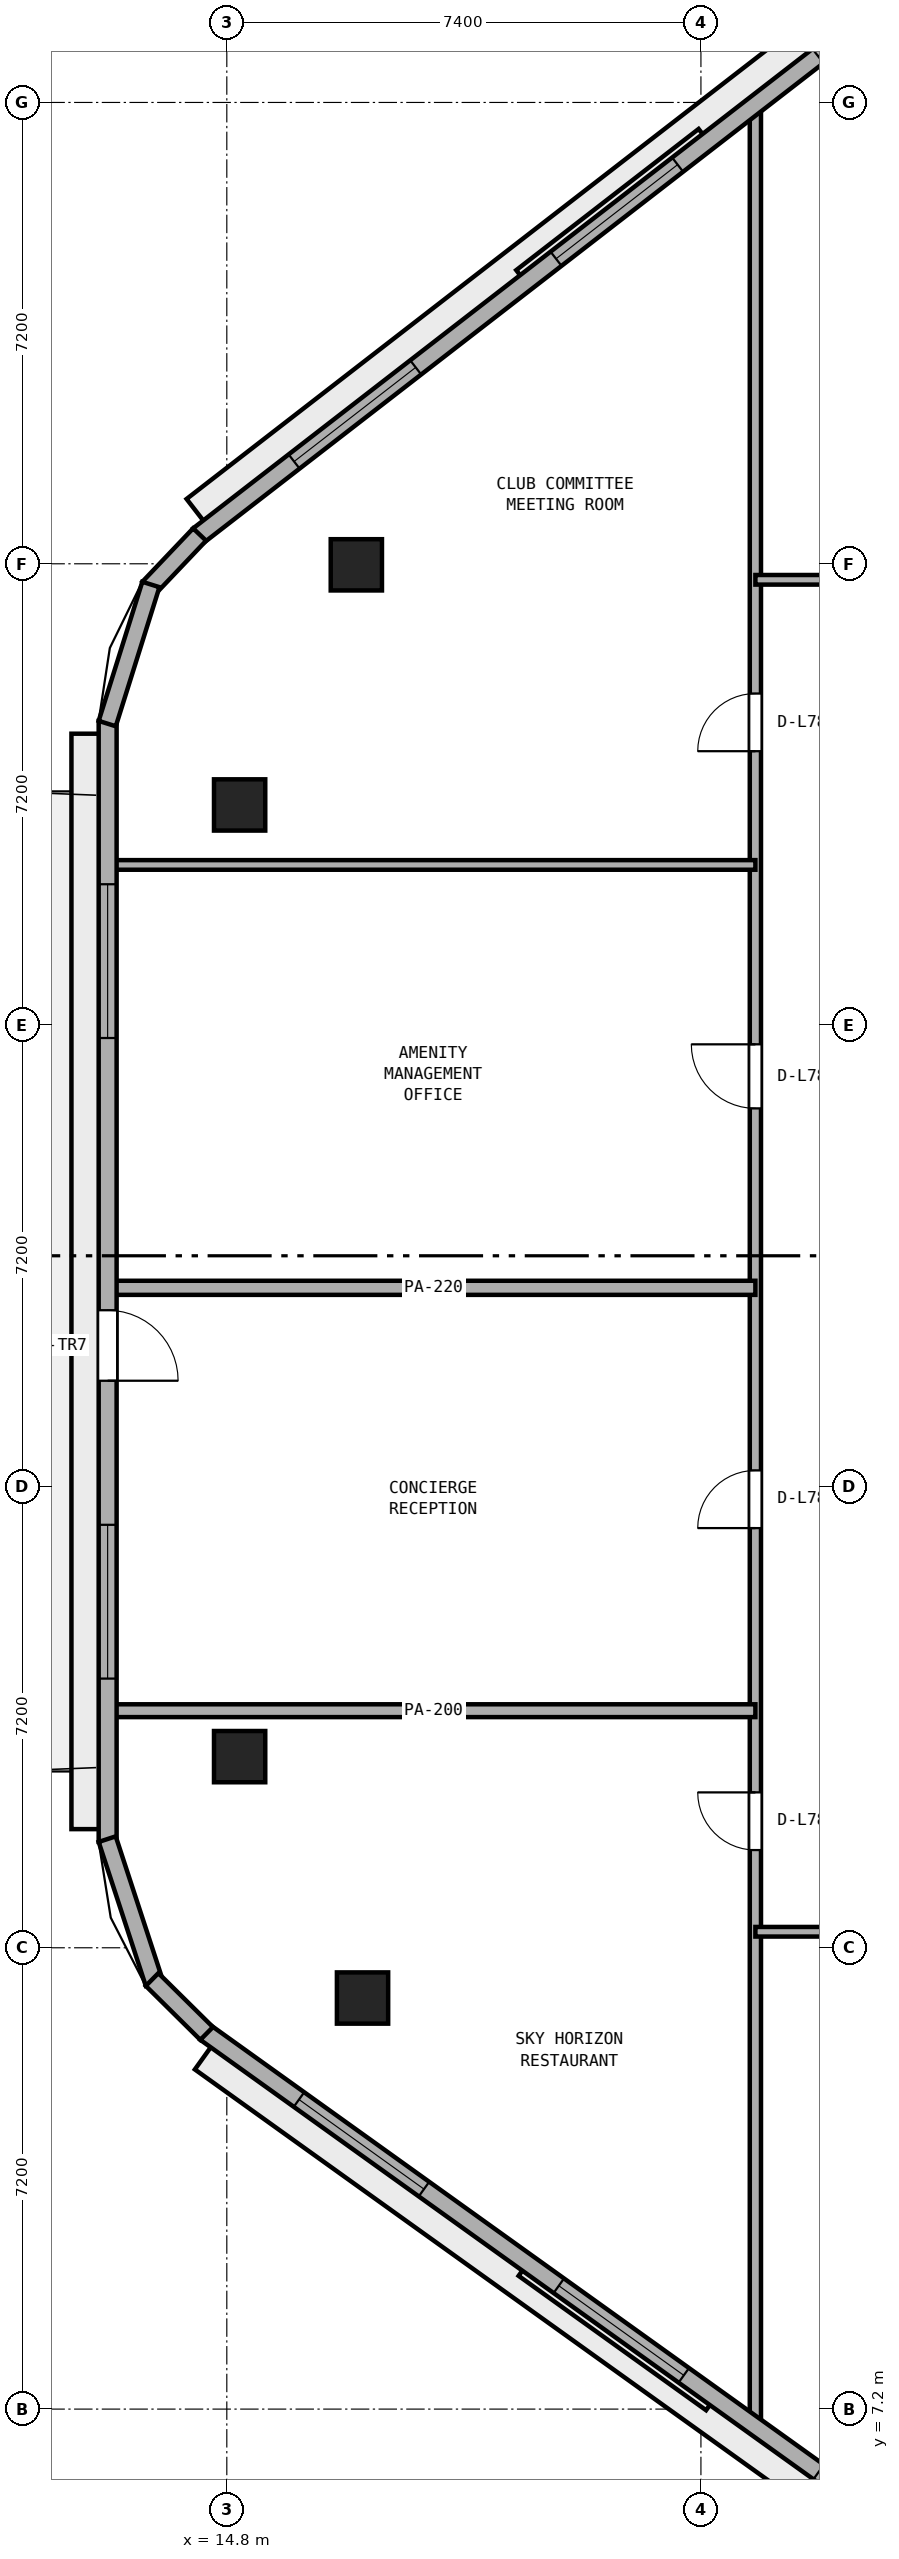
"""IFC4 building model, lengths in metres.
Left out: names, types, materials, properties, quantities, classifications, styles, units other than length and angle.
Written with IfcOpenShell. Run it as: python <this file> out.ifc"""

import sys

from ifc_helpers import new_model, si_unit, direction, frame, frame_2d, origin, origin_2d, place, context, subcontext, project, spatial, rectangle, extrude, element, fill, save


model = new_model("IFC4")
c1 = context("Model", 3, precision=1e-05, world=origin(), true_north=direction((0.0, 1.0)))
c2 = subcontext(c1, "Body", "Model", "MODEL_VIEW")
j1 = project(units=[si_unit("LENGTHUNIT", "METRE"), si_unit("PLANEANGLEUNIT", "RADIAN")], contexts=[c1])
p1 = place(None, origin())
s1 = spatial("IfcSite", under=j1, at=p1, CompositionType="ELEMENT")
p2 = place(p1, origin())
s2 = spatial("IfcBuilding", under=s1, at=p2, CompositionType="ELEMENT")
p3 = place(p2, frame((0.0, 0.0, 304.8)))
s3 = spatial("IfcBuildingStorey", under=s2, at=p3, CompositionType="ELEMENT", Elevation=304.8)
for number, where, z_axis, x_axis in (
    (1, (16.822, 35.984, 0.0), (0.0, 0.0, 1.0), (1.0, 0.0, 0.0)),
    (2, (15.0, 32.236, 0.0), (0.0, 0.0, 1.0), (1.0, 0.0, 0.0)),
    (3, (15.0, 17.383, 0.0), (0.0, 0.0, 1.0), (1.0, 0.0, 0.0)),
    (4, (16.918, 13.616, 0.0), (0.0, 0.0, 1.0), (1.0, 0.0, 0.0)),
):
    element("IfcColumn", number, at=place(p3, frame(where, z_axis=z_axis, x_axis=x_axis)), inside=s3, PredefinedType="COLUMN", context=c2, shape_type="SweptSolid", body=[
        extrude(rectangle(XDim=0.8, YDim=0.8, at=origin_2d()), origin(), (0.0, 0.0, 1.0), 3.8),
    ])
p4 = place(p3, frame((23.05, 6.894, 0.0), z_axis=(0.0, 0.0, 1.0), x_axis=(0.0, 1.0, 0.0)))
e5 = element("IfcWall", 5, at=p4, inside=s3, PredefinedType="PARTITIONING", context=c2, shape_type="SweptSolid", body=[
    extrude(rectangle(XDim=36.312, YDim=0.175, at=frame_2d((18.156, 0.0))), origin(), (0.0, 0.0, 1.0), 3.4),
])
p5 = place(p4, frame((9.031, 0.0, 0.0)))
e6 = element("IfcOpeningElement", 6, at=p5, cuts=e5, PredefinedType="OPENING", context=c2, shape_type="SweptSolid", body=[
    extrude(rectangle(XDim=0.9, YDim=2.1, at=frame_2d((0.45, 1.05))), frame((0.0, 0.097, 0.0), z_axis=(0.0, -1.0, 0.0), x_axis=(1.0, 0.0, 0.0)), (0.0, 0.0, 1.0), 0.195),
])
p6 = place(p4, frame((14.056, 0.0, 0.0)))
e7 = element("IfcOpeningElement", 7, at=p6, cuts=e5, PredefinedType="OPENING", context=c2, shape_type="SweptSolid", body=[
    extrude(rectangle(XDim=0.9, YDim=2.1, at=frame_2d((0.45, 1.05))), frame((0.0, 0.097, 0.0), z_axis=(0.0, -1.0, 0.0), x_axis=(1.0, 0.0, 0.0)), (0.0, 0.0, 1.0), 0.195),
])
p7 = place(p4, frame((20.606, 0.0, 0.0)))
e8 = element("IfcOpeningElement", 8, at=p7, cuts=e5, PredefinedType="OPENING", context=c2, shape_type="SweptSolid", body=[
    extrude(rectangle(XDim=1.0, YDim=2.12, at=frame_2d((0.5, 1.06))), frame((0.0, 0.097, 0.0), z_axis=(0.0, -1.0, 0.0), x_axis=(1.0, 0.0, 0.0)), (0.0, 0.0, 1.0), 0.195),
])
p8 = place(p4, frame((26.181, 0.0, 0.0)))
e9 = element("IfcOpeningElement", 9, at=p8, cuts=e5, PredefinedType="OPENING", context=c2, shape_type="SweptSolid", body=[
    extrude(rectangle(XDim=0.9, YDim=2.1, at=frame_2d((0.45, 1.05))), frame((0.0, 0.097, 0.0), z_axis=(0.0, -1.0, 0.0), x_axis=(1.0, 0.0, 0.0)), (0.0, 0.0, 1.0), 0.195),
])
p9 = place(p3, frame((23.05, 14.65, 0.0), z_axis=(0.0, 0.0, 1.0), x_axis=(1.0, 0.0, 0.0)))
e10 = element("IfcWall", 10, at=p9, inside=s3, PredefinedType="PARTITIONING", context=c2, shape_type="SweptSolid", body=[
    extrude(rectangle(XDim=12.6, YDim=0.15, at=frame_2d((6.3, 0.0))), origin(), (0.0, 0.0, 1.0), 3.4),
])
p10 = place(p9, frame((2.645, 0.0, 0.0)))
e11 = element("IfcOpeningElement", 11, at=p10, cuts=e10, PredefinedType="OPENING", context=c2, shape_type="SweptSolid", body=[
    extrude(rectangle(XDim=0.9, YDim=2.1, at=frame_2d((0.45, 1.05))), frame((0.0, 0.085, 0.0), z_axis=(0.0, -1.0, 0.0), x_axis=(1.0, 0.0, 0.0)), (0.0, 0.0, 1.0), 0.17),
])
p11 = place(p3, frame((13.005, 18.1, 0.0), z_axis=(0.0, 0.0, 1.0), x_axis=(1.0, 0.0, 0.0)))
e12 = element("IfcWall", 12, at=p11, inside=s3, PredefinedType="PARTITIONING", context=c2, shape_type="SweptSolid", body=[
    extrude(rectangle(XDim=10.045, YDim=0.2, at=frame_2d((5.022, 0.0))), origin(), (0.0, 0.0, 1.0), 3.4),
])
p12 = place(p3, frame((13.005, 24.7, 0.0), z_axis=(0.0, 0.0, 1.0), x_axis=(1.0, 0.0, 0.0)))
e13 = element("IfcWall", 13, at=p12, inside=s3, PredefinedType="PARTITIONING", context=c2, shape_type="SweptSolid", body=[
    extrude(rectangle(XDim=10.045, YDim=0.22, at=frame_2d((5.022, 0.0))), origin(), (0.0, 0.0, 1.0), 3.4),
])
p13 = place(p3, frame((13.005, 31.3, 0.0), z_axis=(0.0, 0.0, 1.0), x_axis=(1.0, 0.0, 0.0)))
e14 = element("IfcWall", 14, at=p13, inside=s3, PredefinedType="PARTITIONING", context=c2, shape_type="SweptSolid", body=[
    extrude(rectangle(XDim=10.045, YDim=0.15, at=frame_2d((5.022, 0.0))), origin(), (0.0, 0.0, 1.0), 3.4),
])
p14 = place(p3, frame((23.05, 35.75, 0.0), z_axis=(0.0, 0.0, 1.0), x_axis=(1.0, 0.0, 0.0)))
e15 = element("IfcWall", 15, at=p14, inside=s3, PredefinedType="PARTITIONING", context=c2, shape_type="SweptSolid", body=[
    extrude(rectangle(XDim=25.55, YDim=0.15, at=frame_2d((12.775, 0.0))), origin(), (0.0, 0.0, 1.0), 3.4),
])
p15 = place(p14, frame((6.345, 0.0, 0.0)))
e16 = element("IfcOpeningElement", 16, at=p15, cuts=e15, PredefinedType="OPENING", context=c2, shape_type="SweptSolid", body=[
    extrude(rectangle(XDim=1.0, YDim=2.12, at=frame_2d((0.5, 1.06))), frame((0.0, 0.085, 0.0), z_axis=(0.0, -1.0, 0.0), x_axis=(1.0, 0.0, 0.0)), (0.0, 0.0, 1.0), 0.17),
])
p16 = place(p14, frame((18.93, 0.0, 0.0)))
e17 = element("IfcOpeningElement", 17, at=p16, cuts=e15, PredefinedType="OPENING", context=c2, shape_type="SweptSolid", body=[
    extrude(rectangle(XDim=0.9, YDim=2.1, at=frame_2d((0.45, 1.05))), frame((0.0, 0.085, 0.0), z_axis=(0.0, -1.0, 0.0), x_axis=(1.0, 0.0, 0.0)), (0.0, 0.0, 1.0), 0.17),
])
p17 = place(p3, frame((27.415, 46.547, 0.0), z_axis=(0.0, 0.0, 1.0), x_axis=(-0.790789745248, -0.612087884875, 0.0)))
e18 = element("IfcWall", 18, at=p17, inside=s3, PredefinedType="STANDARD", context=c2, shape_type="SweptSolid", body=[
    extrude(rectangle(XDim=16.509, YDim=0.28, at=frame_2d((8.254, 0.0))), origin(), (0.0, 0.0, 1.0), 3.4),
])
p18 = place(p17, frame((1.885, 0.0, 0.9)))
e19 = element("IfcOpeningElement", 19, at=p18, cuts=e18, PredefinedType="OPENING", context=c2, shape_type="SweptSolid", body=[
    extrude(rectangle(XDim=2.4, YDim=1.75, at=frame_2d((1.2, 0.875))), frame((0.0, 0.15, 0.0), z_axis=(0.0, -1.0, 0.0), x_axis=(1.0, 0.0, 0.0)), (0.0, 0.0, 1.0), 0.3),
])
p19 = place(p17, frame((7.055, 0.0, 0.9)))
e20 = element("IfcOpeningElement", 20, at=p19, cuts=e18, PredefinedType="OPENING", context=c2, shape_type="SweptSolid", body=[
    extrude(rectangle(XDim=2.4, YDim=1.75, at=frame_2d((1.2, 0.875))), frame((0.0, 0.15, 0.0), z_axis=(0.0, -1.0, 0.0), x_axis=(1.0, 0.0, 0.0)), (0.0, 0.0, 1.0), 0.3),
])
p20 = place(p17, frame((12.224, 0.0, 0.9)))
e21 = element("IfcOpeningElement", 21, at=p20, cuts=e18, PredefinedType="OPENING", context=c2, shape_type="SweptSolid", body=[
    extrude(rectangle(XDim=2.4, YDim=1.75, at=frame_2d((1.2, 0.875))), frame((0.0, 0.15, 0.0), z_axis=(0.0, -1.0, 0.0), x_axis=(1.0, 0.0, 0.0)), (0.0, 0.0, 1.0), 0.3),
])
p21 = place(p3, frame((12.94, 33.548, 0.0), z_axis=(0.0, 0.0, 1.0), x_axis=(0.0, -1.0, 0.0)))
e22 = element("IfcWall", 22, at=p21, inside=s3, PredefinedType="STANDARD", context=c2, shape_type="SweptSolid", body=[
    extrude(rectangle(XDim=17.496, YDim=0.28, at=frame_2d((8.748, 0.0))), origin(), (0.0, 0.0, 1.0), 3.4),
])
p22 = place(p21, frame((9.198, 0.0, 0.0)))
e23 = element("IfcOpeningElement", 23, at=p22, cuts=e22, PredefinedType="OPENING", context=c2, shape_type="SweptSolid", body=[
    extrude(rectangle(XDim=1.1, YDim=2.2, at=frame_2d((0.55, 1.1))), frame((0.0, 0.15, 0.0), z_axis=(0.0, -1.0, 0.0), x_axis=(1.0, 0.0, 0.0)), (0.0, 0.0, 1.0), 0.3),
])
p23 = place(p21, frame((2.549, 0.0, 0.9)))
e24 = element("IfcOpeningElement", 24, at=p23, cuts=e22, PredefinedType="OPENING", context=c2, shape_type="SweptSolid", body=[
    extrude(rectangle(XDim=2.4, YDim=1.75, at=frame_2d((1.2, 0.875))), frame((0.0, 0.15, 0.0), z_axis=(0.0, -1.0, 0.0), x_axis=(1.0, 0.0, 0.0)), (0.0, 0.0, 1.0), 0.3),
])
p24 = place(p21, frame((12.547, 0.0, 0.9)))
e25 = element("IfcOpeningElement", 25, at=p24, cuts=e22, PredefinedType="OPENING", context=c2, shape_type="SweptSolid", body=[
    extrude(rectangle(XDim=2.4, YDim=1.75, at=frame_2d((1.2, 0.875))), frame((0.0, 0.15, 0.0), z_axis=(0.0, -1.0, 0.0), x_axis=(1.0, 0.0, 0.0)), (0.0, 0.0, 1.0), 0.3),
])
p25 = place(p3, frame((14.468, 13.077, 0.0), z_axis=(0.0, 0.0, 1.0), x_axis=(0.812809888039, -0.582529042972, 0.0)))
e26 = element("IfcWall", 26, at=p25, inside=s3, PredefinedType="STANDARD", context=c2, shape_type="SweptSolid", body=[
    extrude(rectangle(XDim=15.968, YDim=0.28, at=frame_2d((7.984, 0.0))), origin(), (0.0, 0.0, 1.0), 3.4),
])
p26 = place(p25, frame((1.795, 0.0, 0.9)))
e27 = element("IfcOpeningElement", 27, at=p26, cuts=e26, PredefinedType="OPENING", context=c2, shape_type="SweptSolid", body=[
    extrude(rectangle(XDim=2.4, YDim=1.75, at=frame_2d((1.2, 0.875))), frame((0.0, 0.15, 0.0), z_axis=(0.0, -1.0, 0.0), x_axis=(1.0, 0.0, 0.0)), (0.0, 0.0, 1.0), 0.3),
])
p27 = place(p25, frame((6.784, 0.0, 0.9)))
e28 = element("IfcOpeningElement", 28, at=p27, cuts=e26, PredefinedType="OPENING", context=c2, shape_type="SweptSolid", body=[
    extrude(rectangle(XDim=2.4, YDim=1.75, at=frame_2d((1.2, 0.875))), frame((0.0, 0.15, 0.0), z_axis=(0.0, -1.0, 0.0), x_axis=(1.0, 0.0, 0.0)), (0.0, 0.0, 1.0), 0.3),
])
p28 = place(p25, frame((11.773, 0.0, 0.9)))
e29 = element("IfcOpeningElement", 29, at=p28, cuts=e26, PredefinedType="OPENING", context=c2, shape_type="SweptSolid", body=[
    extrude(rectangle(XDim=2.4, YDim=1.75, at=frame_2d((1.2, 0.875))), frame((0.0, 0.15, 0.0), z_axis=(0.0, -1.0, 0.0), x_axis=(1.0, 0.0, 0.0)), (0.0, 0.0, 1.0), 0.3),
])
p29 = place(p3, frame((14.375, 36.457, 0.0), z_axis=(0.0, 0.0, 1.0), x_axis=(-0.68895569752, -0.724803453948, 0.0)))
e30 = element("IfcWall", 30, at=p29, inside=s3, PredefinedType="STANDARD", context=c2, shape_type="SweptSolid", body=[
    extrude(rectangle(XDim=1.151, YDim=0.28, at=frame_2d((0.575, 0.0))), origin(), (0.0, 0.0, 1.0), 3.4),
])
p30 = place(p3, frame((13.615, 35.677, 0.0), z_axis=(0.0, 0.0, 1.0), x_axis=(-0.299374552426, -0.954135670311, 0.0)))
e31 = element("IfcWall", 31, at=p30, inside=s3, PredefinedType="STANDARD", context=c2, shape_type="SweptSolid", body=[
    extrude(rectangle(XDim=2.275, YDim=0.28, at=frame_2d((1.138, 0.0))), origin(), (0.0, 0.0, 1.0), 3.4),
])
p31 = place(p3, frame((12.933, 16.095, 0.0), z_axis=(0.0, 0.0, 1.0), x_axis=(0.3110492363, -0.950393798695, 0.0)))
e32 = element("IfcWall", 32, at=p31, inside=s3, PredefinedType="STANDARD", context=c2, shape_type="SweptSolid", body=[
    extrude(rectangle(XDim=2.364, YDim=0.28, at=frame_2d((1.182, 0.0))), origin(), (0.0, 0.0, 1.0), 3.4),
])
p32 = place(p3, frame((13.634, 13.904, 0.0), z_axis=(0.0, 0.0, 1.0), x_axis=(0.710971221429, -0.703221104845, 0.0)))
e33 = element("IfcWall", 33, at=p32, inside=s3, PredefinedType="STANDARD", context=c2, shape_type="SweptSolid", body=[
    extrude(rectangle(XDim=1.197, YDim=0.28, at=frame_2d((0.599, 0.0))), origin(), (0.0, 0.0, 1.0), 3.4),
])
p33 = place(p5, origin())
e34 = element("IfcDoor", 34, at=p33, inside=s3, OperationType="SINGLE_SWING_RIGHT", PredefinedType="DOOR", context=c2, shape_type="SweptSolid", body=[
    extrude(rectangle(XDim=0.9, YDim=2.1, at=frame_2d((0.45, 1.05))), frame((0.0, 0.025, 0.0), z_axis=(0.0, -1.0, 0.0), x_axis=(1.0, 0.0, 0.0)), (0.0, 0.0, 1.0), 0.05),
])
fill(e6, e34)
p34 = place(p6, origin())
e35 = element("IfcDoor", 35, at=p34, inside=s3, OperationType="SINGLE_SWING_LEFT", PredefinedType="DOOR", context=c2, shape_type="SweptSolid", body=[
    extrude(rectangle(XDim=0.9, YDim=2.1, at=frame_2d((0.45, 1.05))), frame((0.0, 0.025, 0.0), z_axis=(0.0, -1.0, 0.0), x_axis=(1.0, 0.0, 0.0)), (0.0, 0.0, 1.0), 0.05),
])
fill(e7, e35)
p35 = place(p7, origin())
e36 = element("IfcDoor", 36, at=p35, inside=s3, OperationType="SINGLE_SWING_RIGHT", PredefinedType="DOOR", context=c2, shape_type="SweptSolid", body=[
    extrude(rectangle(XDim=1.0, YDim=2.12, at=frame_2d((0.5, 1.06))), frame((0.0, 0.025, 0.0), z_axis=(0.0, -1.0, 0.0), x_axis=(1.0, 0.0, 0.0)), (0.0, 0.0, 1.0), 0.05),
])
fill(e8, e36)
p36 = place(p8, origin())
e37 = element("IfcDoor", 37, at=p36, inside=s3, OperationType="SINGLE_SWING_LEFT", PredefinedType="DOOR", context=c2, shape_type="SweptSolid", body=[
    extrude(rectangle(XDim=0.9, YDim=2.1, at=frame_2d((0.45, 1.05))), frame((0.0, 0.025, 0.0), z_axis=(0.0, -1.0, 0.0), x_axis=(1.0, 0.0, 0.0)), (0.0, 0.0, 1.0), 0.05),
])
fill(e9, e37)
p37 = place(p18, origin())
e38 = element("IfcWindow", 38, at=p37, inside=s3, PartitioningType="SINGLE_PANEL", PredefinedType="WINDOW", context=c2, shape_type="SweptSolid", body=[
    extrude(rectangle(XDim=2.4, YDim=1.75, at=frame_2d((1.2, 0.875))), frame((0.0, 0.03, 0.0), z_axis=(0.0, -1.0, 0.0), x_axis=(1.0, 0.0, 0.0)), (0.0, 0.0, 1.0), 0.06),
])
fill(e19, e38)
p38 = place(p19, origin())
e39 = element("IfcWindow", 39, at=p38, inside=s3, PartitioningType="SINGLE_PANEL", PredefinedType="WINDOW", context=c2, shape_type="SweptSolid", body=[
    extrude(rectangle(XDim=2.4, YDim=1.75, at=frame_2d((1.2, 0.875))), frame((0.0, 0.03, 0.0), z_axis=(0.0, -1.0, 0.0), x_axis=(1.0, 0.0, 0.0)), (0.0, 0.0, 1.0), 0.06),
])
fill(e20, e39)
p39 = place(p20, origin())
e40 = element("IfcWindow", 40, at=p39, inside=s3, PartitioningType="SINGLE_PANEL", PredefinedType="WINDOW", context=c2, shape_type="SweptSolid", body=[
    extrude(rectangle(XDim=2.4, YDim=1.75, at=frame_2d((1.2, 0.875))), frame((0.0, 0.03, 0.0), z_axis=(0.0, -1.0, 0.0), x_axis=(1.0, 0.0, 0.0)), (0.0, 0.0, 1.0), 0.06),
])
fill(e21, e40)
p40 = place(p22, origin())
e41 = element("IfcDoor", 41, at=p40, inside=s3, OperationType="SINGLE_SWING_RIGHT", PredefinedType="DOOR", context=c2, shape_type="SweptSolid", body=[
    extrude(rectangle(XDim=1.1, YDim=2.2, at=frame_2d((0.55, 1.1))), frame((0.0, 0.025, 0.0), z_axis=(0.0, -1.0, 0.0), x_axis=(1.0, 0.0, 0.0)), (0.0, 0.0, 1.0), 0.05),
])
fill(e23, e41)
p41 = place(p23, origin())
e42 = element("IfcWindow", 42, at=p41, inside=s3, PartitioningType="SINGLE_PANEL", PredefinedType="WINDOW", context=c2, shape_type="SweptSolid", body=[
    extrude(rectangle(XDim=2.4, YDim=1.75, at=frame_2d((1.2, 0.875))), frame((0.0, 0.03, 0.0), z_axis=(0.0, -1.0, 0.0), x_axis=(1.0, 0.0, 0.0)), (0.0, 0.0, 1.0), 0.06),
])
fill(e24, e42)
p42 = place(p24, origin())
e43 = element("IfcWindow", 43, at=p42, inside=s3, PartitioningType="SINGLE_PANEL", PredefinedType="WINDOW", context=c2, shape_type="SweptSolid", body=[
    extrude(rectangle(XDim=2.4, YDim=1.75, at=frame_2d((1.2, 0.875))), frame((0.0, 0.03, 0.0), z_axis=(0.0, -1.0, 0.0), x_axis=(1.0, 0.0, 0.0)), (0.0, 0.0, 1.0), 0.06),
])
fill(e25, e43)
p43 = place(p26, origin())
e44 = element("IfcWindow", 44, at=p43, inside=s3, PartitioningType="SINGLE_PANEL", PredefinedType="WINDOW", context=c2, shape_type="SweptSolid", body=[
    extrude(rectangle(XDim=2.4, YDim=1.75, at=frame_2d((1.2, 0.875))), frame((0.0, 0.03, 0.0), z_axis=(0.0, -1.0, 0.0), x_axis=(1.0, 0.0, 0.0)), (0.0, 0.0, 1.0), 0.06),
])
fill(e27, e44)
p44 = place(p27, origin())
e45 = element("IfcWindow", 45, at=p44, inside=s3, PartitioningType="SINGLE_PANEL", PredefinedType="WINDOW", context=c2, shape_type="SweptSolid", body=[
    extrude(rectangle(XDim=2.4, YDim=1.75, at=frame_2d((1.2, 0.875))), frame((0.0, 0.03, 0.0), z_axis=(0.0, -1.0, 0.0), x_axis=(1.0, 0.0, 0.0)), (0.0, 0.0, 1.0), 0.06),
])
fill(e28, e45)
p45 = place(p28, origin())
e46 = element("IfcWindow", 46, at=p45, inside=s3, PartitioningType="SINGLE_PANEL", PredefinedType="WINDOW", context=c2, shape_type="SweptSolid", body=[
    extrude(rectangle(XDim=2.4, YDim=1.75, at=frame_2d((1.2, 0.875))), frame((0.0, 0.03, 0.0), z_axis=(0.0, -1.0, 0.0), x_axis=(1.0, 0.0, 0.0)), (0.0, 0.0, 1.0), 0.06),
])
fill(e29, e46)
save(model, sys.argv[1])
